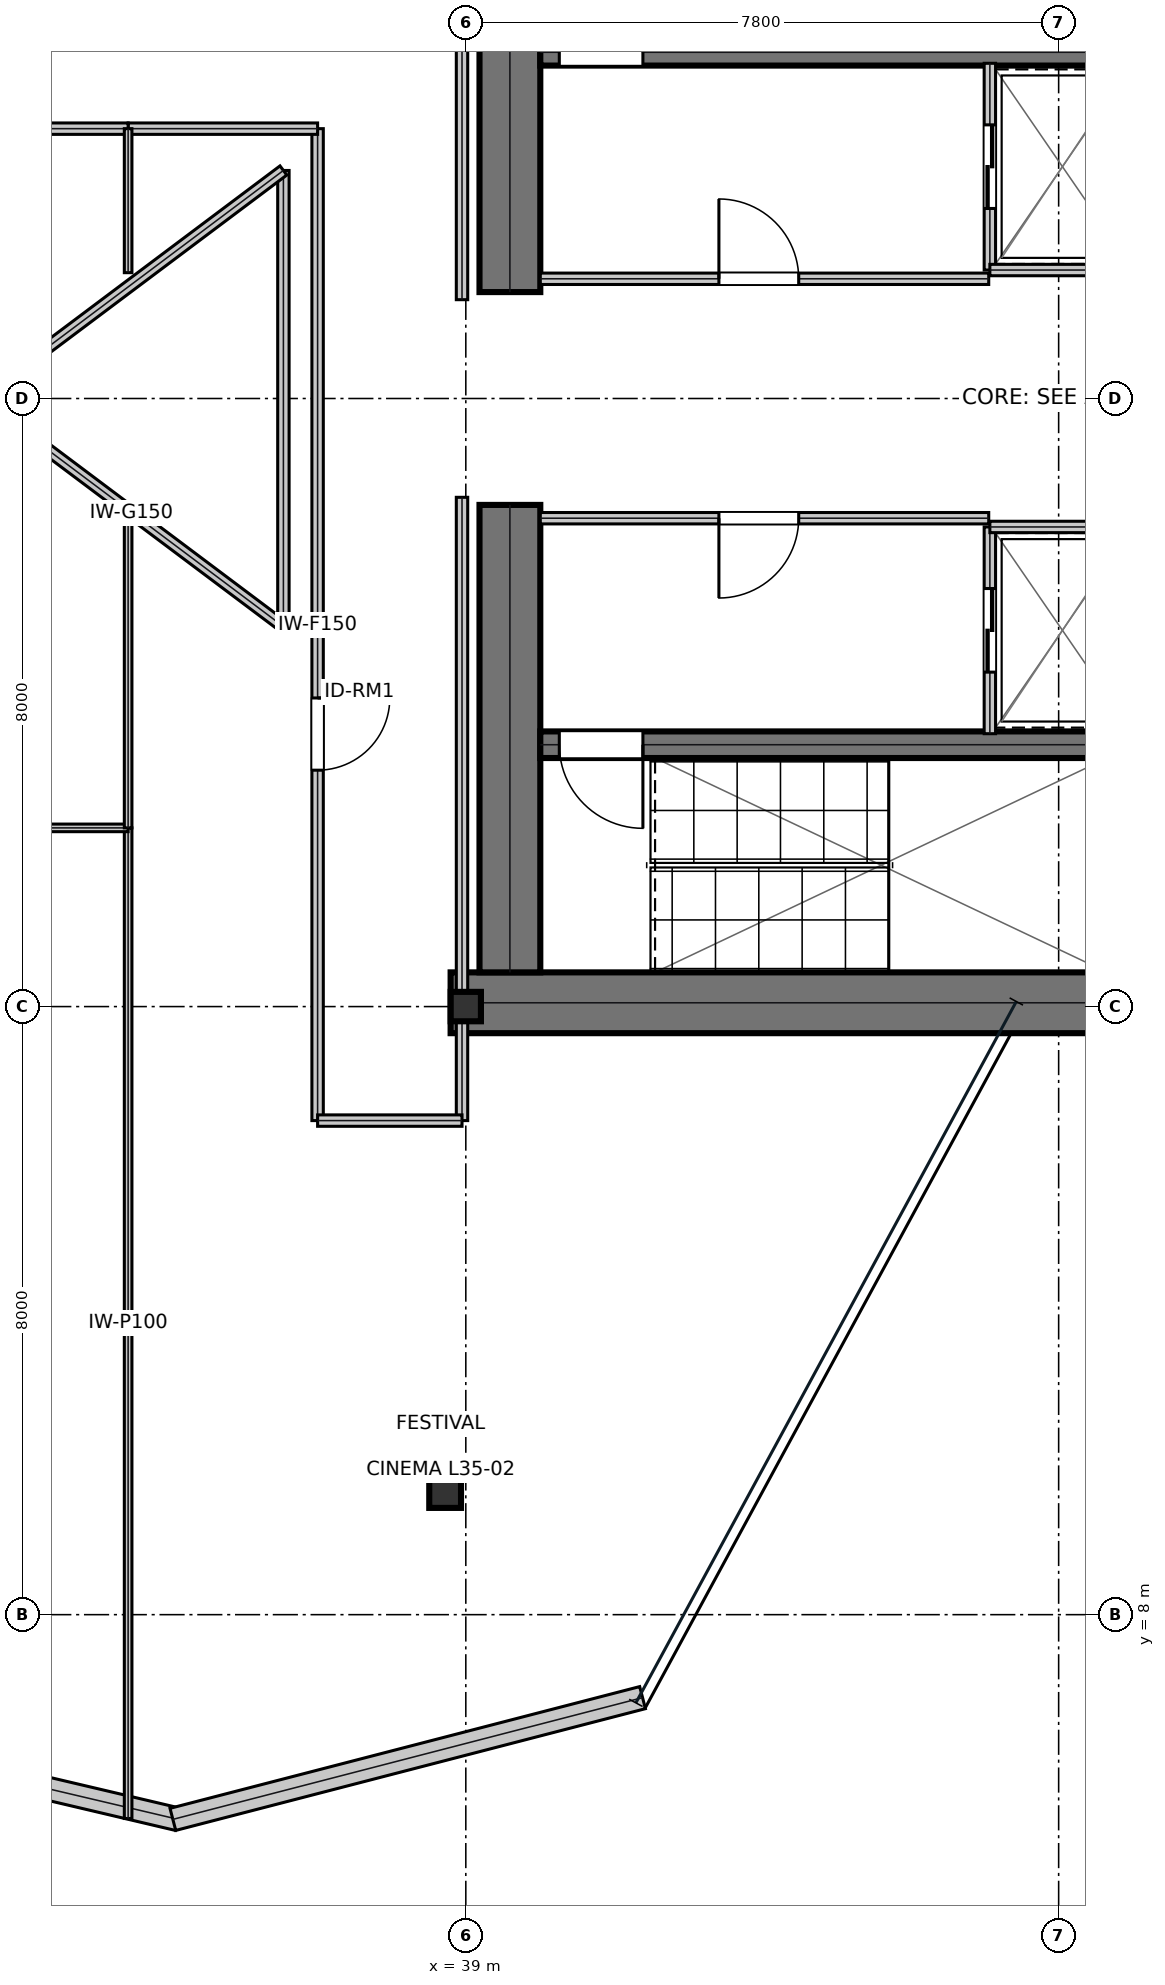
"""IFC4 building model, lengths in metres.
Left out: names, types, materials, properties, quantities, classifications, styles, units other than length and angle.
Written with IfcOpenShell. Run it as: python <this file> out.ifc"""

import sys

from ifc_helpers import new_model, si_unit, direction, frame, frame_2d, origin, origin_2d, place, context, subcontext, project, spatial, rectangle, i_section, extrude, element, fill, save


model = new_model("IFC4")
c1 = context("Model", 3, precision=1e-05, world=origin(), true_north=direction((0.0, 1.0)))
c2 = subcontext(c1, "Body", "Model", "MODEL_VIEW")
j1 = project(units=[si_unit("LENGTHUNIT", "METRE"), si_unit("PLANEANGLEUNIT", "RADIAN")], contexts=[c1])
p1 = place(None, origin())
s1 = spatial("IfcSite", under=j1, at=p1, CompositionType="ELEMENT")
p2 = place(p1, origin())
s2 = spatial("IfcBuilding", under=s1, at=p2, CompositionType="ELEMENT")
p3 = place(p2, frame((0.0, 0.0, 153.3)))
s3 = spatial("IfcBuildingStorey", under=s2, at=p3, CompositionType="ELEMENT", Elevation=153.3)
p4 = place(p3, frame((38.8, 16.05, 0.0), z_axis=(0.0, 0.0, 1.0), x_axis=(1.0, 0.0, 0.0)))
e1 = element("IfcWall", 1, at=p4, inside=s3, PredefinedType="SHEAR", context=c2, shape_type="SweptSolid", body=[
    extrude(rectangle(XDim=16.0, YDim=0.8, at=frame_2d((8.0, 0.0))), origin(), (0.0, 0.0, 1.0), 3.81),
])
for number, where, z_axis, x_axis in (
    (2, (39.58, 16.45, 0.0), (0.0, 0.0, 1.0), (0.0, 1.0, 0.0)),
    (3, (39.58, 25.4, 0.0), (0.0, 0.0, 1.0), (0.0, 1.0, 0.0)),
):
    element("IfcWall", number, at=place(p3, frame(where, z_axis=z_axis, x_axis=x_axis)), inside=s3, PredefinedType="SHEAR", context=c2, shape_type="SweptSolid", body=[
        extrude(rectangle(XDim=6.15, YDim=0.8, at=frame_2d((3.075, 0.0))), origin(), (0.0, 0.0, 1.0), 3.81),
    ])
p5 = place(p3, frame((39.98, 28.555, 0.0), z_axis=(0.0, 0.0, 1.0), x_axis=(1.0, 0.0, 0.0)))
e4 = element("IfcWall", 4, at=p5, inside=s3, PredefinedType="SHEAR", context=c2, shape_type="SweptSolid", body=[
    extrude(rectangle(XDim=7.71, YDim=0.35, at=frame_2d((3.855, 0.0))), origin(), (0.0, 0.0, 1.0), 3.81),
])
p6 = place(p5, frame((0.25, 0.0, 0.0)))
e5 = element("IfcOpeningElement", 5, at=p6, cuts=e4, PredefinedType="OPENING", context=c2, shape_type="SweptSolid", body=[
    extrude(rectangle(XDim=1.1, YDim=2.15, at=frame_2d((0.55, 1.075))), frame((0.0, 0.185, 0.0), z_axis=(0.0, -1.0, 0.0), x_axis=(1.0, 0.0, 0.0)), (0.0, 0.0, 1.0), 0.37),
])
p7 = place(p3, frame((39.98, 19.445, 0.0), z_axis=(0.0, 0.0, 1.0), x_axis=(1.0, 0.0, 0.0)))
e6 = element("IfcWall", 6, at=p7, inside=s3, PredefinedType="SHEAR", context=c2, shape_type="SweptSolid", body=[
    extrude(rectangle(XDim=7.71, YDim=0.35, at=frame_2d((3.855, 0.0))), origin(), (0.0, 0.0, 1.0), 3.81),
])
p8 = place(p7, frame((0.25, 0.0, 0.0)))
e7 = element("IfcOpeningElement", 7, at=p8, cuts=e6, PredefinedType="OPENING", context=c2, shape_type="SweptSolid", body=[
    extrude(rectangle(XDim=1.1, YDim=2.15, at=frame_2d((0.55, 1.075))), frame((0.0, 0.185, 0.0), z_axis=(0.0, -1.0, 0.0), x_axis=(1.0, 0.0, 0.0)), (0.0, 0.0, 1.0), 0.37),
])
p9 = place(p3, frame((39.0, 16.0, 0.0), z_axis=(0.0, 0.0, 1.0), x_axis=(1.0, 0.0, 0.0)))
e8 = element("IfcColumn", 8, at=p9, inside=s3, PredefinedType="COLUMN", context=c2, shape_type="SweptSolid", body=[
    extrude(i_section(OverallWidth=0.398, OverallDepth=0.387, WebThickness=0.021, FlangeThickness=0.033, at=origin_2d()), origin(), (0.0, 0.0, 1.0), 4.044),
])
p10 = place(p3, frame((38.728, 9.632, 0.016), z_axis=(0.0, 0.0, 1.0), x_axis=(1.0, 0.0, 0.0)))
e9 = element("IfcColumn", 9, at=p10, inside=s3, PredefinedType="COLUMN", context=c2, shape_type="SweptSolid", body=[
    extrude(i_section(OverallWidth=0.418, OverallDepth=0.455, WebThickness=0.042, FlangeThickness=0.068, at=origin_2d()), origin(), (0.0, 0.0, 1.0), 4.018),
])
p11 = place(p3, frame((29.033, 6.763, 0.0), z_axis=(0.0, 0.0, 1.0), x_axis=(0.973355101444, -0.229302957882, 0.0)))
e10 = element("IfcWall", 10, at=p11, inside=s3, PredefinedType="STANDARD", context=c2, shape_type="SweptSolid", body=[
    extrude(rectangle(XDim=6.349, YDim=0.3, at=frame_2d((3.174, 0.0))), origin(), (0.0, 0.0, 1.0), 3.81),
])
p12 = place(p3, frame((35.146, 5.307, 0.0), z_axis=(0.0, 0.0, 1.0), x_axis=(0.96801891639, 0.250877216005, 0.0)))
e11 = element("IfcWall", 11, at=p12, inside=s3, PredefinedType="STANDARD", context=c2, shape_type="SweptSolid", body=[
    extrude(rectangle(XDim=6.384, YDim=0.3, at=frame_2d((3.192, 0.0))), origin(), (0.0, 0.0, 1.0), 3.81),
])
p13 = place(p3, frame((39.98, 25.575, 0.0), z_axis=(0.0, 0.0, 1.0), x_axis=(1.0, 0.0, 0.0)))
e12 = element("IfcWall", 12, at=p13, inside=s3, PredefinedType="PARTITIONING", context=c2, shape_type="SweptSolid", body=[
    extrude(rectangle(XDim=5.9, YDim=0.15, at=frame_2d((2.95, 0.0))), origin(), (0.0, 0.0, 1.0), 3.81),
])
p14 = place(p13, frame((2.35, 0.0, 0.0)))
e13 = element("IfcOpeningElement", 13, at=p14, cuts=e12, PredefinedType="OPENING", context=c2, shape_type="SweptSolid", body=[
    extrude(rectangle(XDim=1.05, YDim=2.15, at=frame_2d((0.525, 1.075))), frame((0.0, 0.085, 0.0), z_axis=(0.0, -1.0, 0.0), x_axis=(1.0, 0.0, 0.0)), (0.0, 0.0, 1.0), 0.17),
])
p15 = place(p3, frame((39.98, 22.425, 0.0), z_axis=(0.0, 0.0, 1.0), x_axis=(1.0, 0.0, 0.0)))
e14 = element("IfcWall", 14, at=p15, inside=s3, PredefinedType="PARTITIONING", context=c2, shape_type="SweptSolid", body=[
    extrude(rectangle(XDim=5.9, YDim=0.15, at=frame_2d((2.95, 0.0))), origin(), (0.0, 0.0, 1.0), 3.81),
])
p16 = place(p15, frame((2.35, 0.0, 0.0)))
e15 = element("IfcOpeningElement", 15, at=p16, cuts=e14, PredefinedType="OPENING", context=c2, shape_type="SweptSolid", body=[
    extrude(rectangle(XDim=1.05, YDim=2.15, at=frame_2d((0.525, 1.075))), frame((0.0, 0.085, 0.0), z_axis=(0.0, -1.0, 0.0), x_axis=(1.0, 0.0, 0.0)), (0.0, 0.0, 1.0), 0.17),
])
p17 = place(p3, frame((45.895, 25.69, 0.0), z_axis=(0.0, 0.0, 1.0), x_axis=(0.0, 1.0, 0.0)))
e16 = element("IfcWall", 16, at=p17, inside=s3, PredefinedType="PARTITIONING", context=c2, shape_type="SweptSolid", body=[
    extrude(rectangle(XDim=2.72, YDim=0.15, at=frame_2d((1.36, 0.0))), origin(), (0.0, 0.0, 1.0), 3.81),
])
p18 = place(p17, frame((0.81, 0.0, 0.0)))
e17 = element("IfcOpeningElement", 17, at=p18, cuts=e16, PredefinedType="OPENING", context=c2, shape_type="SweptSolid", body=[
    extrude(rectangle(XDim=1.1, YDim=2.15, at=frame_2d((0.55, 1.075))), frame((0.0, 0.085, 0.0), z_axis=(0.0, -1.0, 0.0), x_axis=(1.0, 0.0, 0.0)), (0.0, 0.0, 1.0), 0.17),
])
p19 = place(p3, frame((45.895, 25.69, 0.0), z_axis=(0.0, 0.0, 1.0), x_axis=(1.0, 0.0, 0.0)))
e18 = element("IfcWall", 18, at=p19, inside=s3, PredefinedType="PARTITIONING", context=c2, shape_type="SweptSolid", body=[
    extrude(rectangle(XDim=1.915, YDim=0.15, at=frame_2d((0.958, 0.0))), origin(), (0.0, 0.0, 1.0), 3.81),
])
p20 = place(p3, frame((45.895, 19.59, 0.0), z_axis=(0.0, 0.0, 1.0), x_axis=(0.0, 1.0, 0.0)))
e19 = element("IfcWall", 19, at=p20, inside=s3, PredefinedType="PARTITIONING", context=c2, shape_type="SweptSolid", body=[
    extrude(rectangle(XDim=2.72, YDim=0.15, at=frame_2d((1.36, 0.0))), origin(), (0.0, 0.0, 1.0), 3.81),
])
p21 = place(p20, frame((0.81, 0.0, 0.0)))
e20 = element("IfcOpeningElement", 20, at=p21, cuts=e19, PredefinedType="OPENING", context=c2, shape_type="SweptSolid", body=[
    extrude(rectangle(XDim=1.1, YDim=2.15, at=frame_2d((0.55, 1.075))), frame((0.0, 0.085, 0.0), z_axis=(0.0, -1.0, 0.0), x_axis=(1.0, 0.0, 0.0)), (0.0, 0.0, 1.0), 0.17),
])
p22 = place(p3, frame((45.895, 22.31, 0.0), z_axis=(0.0, 0.0, 1.0), x_axis=(1.0, 0.0, 0.0)))
e21 = element("IfcWall", 21, at=p22, inside=s3, PredefinedType="PARTITIONING", context=c2, shape_type="SweptSolid", body=[
    extrude(rectangle(XDim=1.915, YDim=0.15, at=frame_2d((0.958, 0.0))), origin(), (0.0, 0.0, 1.0), 3.81),
])
p23 = place(p3, frame((37.05, 14.5, 0.0), z_axis=(0.0, 0.0, 1.0), x_axis=(0.0, 1.0, 0.0)))
e22 = element("IfcWall", 22, at=p23, inside=s3, PredefinedType="PARTITIONING", context=c2, shape_type="SweptSolid", body=[
    extrude(rectangle(XDim=13.05, YDim=0.15, at=frame_2d((6.525, 0.0))), origin(), (0.0, 0.0, 1.0), 3.19),
])
p24 = place(p23, frame((4.61, 0.0, 0.0)))
e23 = element("IfcOpeningElement", 23, at=p24, cuts=e22, PredefinedType="OPENING", context=c2, shape_type="SweptSolid", body=[
    extrude(rectangle(XDim=0.95, YDim=2.15, at=frame_2d((0.475, 1.075))), frame((0.0, 0.085, 0.0), z_axis=(0.0, -1.0, 0.0), x_axis=(1.0, 0.0, 0.0)), (0.0, 0.0, 1.0), 0.17),
])
p25 = place(p3, frame((38.95, 14.5, 0.0), z_axis=(0.0, 0.0, 1.0), x_axis=(0.0, 1.0, 0.0)))
e24 = element("IfcWall", 24, at=p25, inside=s3, PredefinedType="PARTITIONING", context=c2, shape_type="SweptSolid", body=[
    extrude(rectangle(XDim=8.2, YDim=0.15, at=frame_2d((4.1, 0.0))), origin(), (0.0, 0.0, 1.0), 3.19),
])
p26 = place(p3, frame((34.557, 27.55, 0.0), z_axis=(0.0, 0.0, 1.0), x_axis=(1.0, 0.0, 0.0)))
e25 = element("IfcWall", 25, at=p26, inside=s3, PredefinedType="PARTITIONING", context=c2, shape_type="SweptSolid", body=[
    extrude(rectangle(XDim=2.493, YDim=0.15, at=frame_2d((1.247, 0.0))), origin(), (0.0, 0.0, 1.0), 3.443),
])
p27 = place(p3, frame((37.05, 14.5, 0.0), z_axis=(0.0, 0.0, 1.0), x_axis=(1.0, 0.0, 0.0)))
e26 = element("IfcWall", 26, at=p27, inside=s3, PredefinedType="PARTITIONING", context=c2, shape_type="SweptSolid", body=[
    extrude(rectangle(XDim=1.9, YDim=0.15, at=frame_2d((0.95, 0.0))), origin(), (0.0, 0.0, 1.0), 3.19),
])
p28 = place(p3, frame((29.4, 27.55, 0.0), z_axis=(0.0, 0.0, 1.0), x_axis=(1.0, 0.0, 0.0)))
e27 = element("IfcWall", 27, at=p28, inside=s3, PredefinedType="PARTITIONING", context=c2, shape_type="SweptSolid", body=[
    extrude(rectangle(XDim=5.157, YDim=0.15, at=frame_2d((2.579, 0.0))), origin(), (0.0, 0.0, 1.0), 3.19),
])
p29 = place(p3, frame((38.95, 25.3, 0.0), z_axis=(0.0, 0.0, 1.0), x_axis=(0.0, 1.0, 0.0)))
e28 = element("IfcWall", 28, at=p29, inside=s3, PredefinedType="PARTITIONING", context=c2, shape_type="SweptSolid", body=[
    extrude(rectangle(XDim=8.2, YDim=0.15, at=frame_2d((4.1, 0.0))), origin(), (0.0, 0.0, 1.0), 3.19),
])
p30 = place(p3, frame((34.557, 5.318, 0.0), z_axis=(0.0, 0.0, 1.0), x_axis=(0.0, 1.0, 0.0)))
e29 = element("IfcWall", 29, at=p30, inside=s3, PredefinedType="PARTITIONING", context=c2, shape_type="SweptSolid", body=[
    extrude(rectangle(XDim=13.033, YDim=0.1, at=frame_2d((6.517, 0.0))), origin(), (0.0, 0.0, 1.0), 3.19),
])
p31 = place(p3, frame((29.4, 18.351, 0.0), z_axis=(0.0, 0.0, 1.0), x_axis=(1.0, 0.0, 0.0)))
e30 = element("IfcWall", 30, at=p31, inside=s3, PredefinedType="PARTITIONING", context=c2, shape_type="SweptSolid", body=[
    extrude(rectangle(XDim=5.157, YDim=0.1, at=frame_2d((2.579, 0.0))), origin(), (0.0, 0.0, 1.0), 3.19),
])
p32 = place(p3, frame((34.557, 18.351, 0.0), z_axis=(0.0, 0.0, 1.0), x_axis=(0.0, 1.0, 0.0)))
e31 = element("IfcWall", 31, at=p32, inside=s3, PredefinedType="PARTITIONING", context=c2, shape_type="SweptSolid", body=[
    extrude(rectangle(XDim=3.994, YDim=0.1, at=frame_2d((1.997, 0.0))), origin(), (0.0, 0.0, 1.0), 3.81),
])
p33 = place(p3, frame((34.557, 25.655, 0.0), z_axis=(0.0, 0.0, 1.0), x_axis=(0.0, 1.0, 0.0)))
e32 = element("IfcWall", 32, at=p33, inside=s3, PredefinedType="PARTITIONING", context=c2, shape_type="SweptSolid", body=[
    extrude(rectangle(XDim=1.895, YDim=0.1, at=frame_2d((0.947, 0.0))), origin(), (0.0, 0.0, 1.0), 3.81),
])
p34 = place(p3, frame((32.6, 24.0, 0.0), z_axis=(0.0, 0.0, 1.0), x_axis=(0.8, -0.6, 0.0)))
e33 = element("IfcWall", 33, at=p34, inside=s3, PredefinedType="MOVABLE", context=c2, shape_type="SweptSolid", body=[
    extrude(rectangle(XDim=5.0, YDim=0.15, at=frame_2d((2.5, 0.0))), origin(), (0.0, 0.0, 1.0), 3.81),
])
p35 = place(p3, frame((36.6, 21.0, 0.0), z_axis=(0.0, 0.0, 1.0), x_axis=(0.0, 1.0, 0.0)))
e34 = element("IfcWall", 34, at=p35, inside=s3, PredefinedType="MOVABLE", context=c2, shape_type="SweptSolid", body=[
    extrude(rectangle(XDim=6.0, YDim=0.15, at=frame_2d((3.0, 0.0))), origin(), (0.0, 0.0, 1.0), 3.81),
])
p36 = place(p3, frame((36.6, 27.0, 0.0), z_axis=(0.0, 0.0, 1.0), x_axis=(-0.8, -0.6, 0.0)))
e35 = element("IfcWall", 35, at=p36, inside=s3, PredefinedType="MOVABLE", context=c2, shape_type="SweptSolid", body=[
    extrude(rectangle(XDim=5.0, YDim=0.15, at=frame_2d((2.5, 0.0))), origin(), (0.0, 0.0, 1.0), 3.81),
])
p37 = place(p14, origin())
e36 = element("IfcDoor", 36, at=p37, inside=s3, OperationType="SINGLE_SWING_LEFT", PredefinedType="DOOR", context=c2, shape_type="SweptSolid", body=[
    extrude(rectangle(XDim=1.05, YDim=2.15, at=frame_2d((0.525, 1.075))), frame((0.0, 0.025, 0.0), z_axis=(0.0, -1.0, 0.0), x_axis=(1.0, 0.0, 0.0)), (0.0, 0.0, 1.0), 0.05),
])
fill(e13, e36)
p38 = place(p16, frame((1.05, 0.0, 0.0), z_axis=(0.0, 0.0, 1.0), x_axis=(-1.0, 0.0, 0.0)))
e37 = element("IfcDoor", 37, at=p38, inside=s3, OperationType="SINGLE_SWING_RIGHT", PredefinedType="DOOR", context=c2, shape_type="SweptSolid", body=[
    extrude(rectangle(XDim=1.05, YDim=2.15, at=frame_2d((0.525, 1.075))), frame((0.0, 0.025, 0.0), z_axis=(0.0, -1.0, 0.0), x_axis=(1.0, 0.0, 0.0)), (0.0, 0.0, 1.0), 0.05),
])
fill(e15, e37)
p39 = place(p18, frame((1.1, 0.0, 0.0), z_axis=(0.0, 0.0, 1.0), x_axis=(-1.0, 0.0, 0.0)))
e38 = element("IfcDoor", 38, at=p39, inside=s3, OperationType="DOUBLE_DOOR_SLIDING", PredefinedType="DOOR", context=c2, shape_type="SweptSolid", body=[
    extrude(rectangle(XDim=1.1, YDim=2.15, at=frame_2d((0.55, 1.075))), frame((0.0, 0.025, 0.0), z_axis=(0.0, -1.0, 0.0), x_axis=(1.0, 0.0, 0.0)), (0.0, 0.0, 1.0), 0.05),
])
fill(e17, e38)
p40 = place(p21, frame((1.1, 0.0, 0.0), z_axis=(0.0, 0.0, 1.0), x_axis=(-1.0, 0.0, 0.0)))
e39 = element("IfcDoor", 39, at=p40, inside=s3, OperationType="DOUBLE_DOOR_SLIDING", PredefinedType="DOOR", context=c2, shape_type="SweptSolid", body=[
    extrude(rectangle(XDim=1.1, YDim=2.15, at=frame_2d((0.55, 1.075))), frame((0.0, 0.025, 0.0), z_axis=(0.0, -1.0, 0.0), x_axis=(1.0, 0.0, 0.0)), (0.0, 0.0, 1.0), 0.05),
])
fill(e20, e39)
p41 = place(p24, frame((0.95, 0.0, 0.0), z_axis=(0.0, 0.0, 1.0), x_axis=(-1.0, 0.0, 0.0)))
e40 = element("IfcDoor", 40, at=p41, inside=s3, OperationType="SINGLE_SWING_LEFT", PredefinedType="DOOR", context=c2, shape_type="SweptSolid", body=[
    extrude(rectangle(XDim=0.95, YDim=2.15, at=frame_2d((0.475, 1.075))), frame((0.0, 0.025, 0.0), z_axis=(0.0, -1.0, 0.0), x_axis=(1.0, 0.0, 0.0)), (0.0, 0.0, 1.0), 0.05),
])
fill(e23, e40)
p42 = place(p6, origin())
e41 = element("IfcDoor", 41, at=p42, inside=s3, OperationType="SINGLE_SWING_RIGHT", PredefinedType="DOOR", context=c2, shape_type="SweptSolid", body=[
    extrude(rectangle(XDim=1.1, YDim=2.15, at=frame_2d((0.55, 1.075))), frame((0.0, 0.025, 0.0), z_axis=(0.0, -1.0, 0.0), x_axis=(1.0, 0.0, 0.0)), (0.0, 0.0, 1.0), 0.05),
])
fill(e5, e41)
p43 = place(p8, frame((1.1, 0.0, 0.0), z_axis=(0.0, 0.0, 1.0), x_axis=(-1.0, 0.0, 0.0)))
e42 = element("IfcDoor", 42, at=p43, inside=s3, OperationType="SINGLE_SWING_LEFT", PredefinedType="DOOR", context=c2, shape_type="SweptSolid", body=[
    extrude(rectangle(XDim=1.1, YDim=2.15, at=frame_2d((0.55, 1.075))), frame((0.0, 0.025, 0.0), z_axis=(0.0, -1.0, 0.0), x_axis=(1.0, 0.0, 0.0)), (0.0, 0.0, 1.0), 0.05),
])
fill(e7, e42)
save(model, sys.argv[1])
